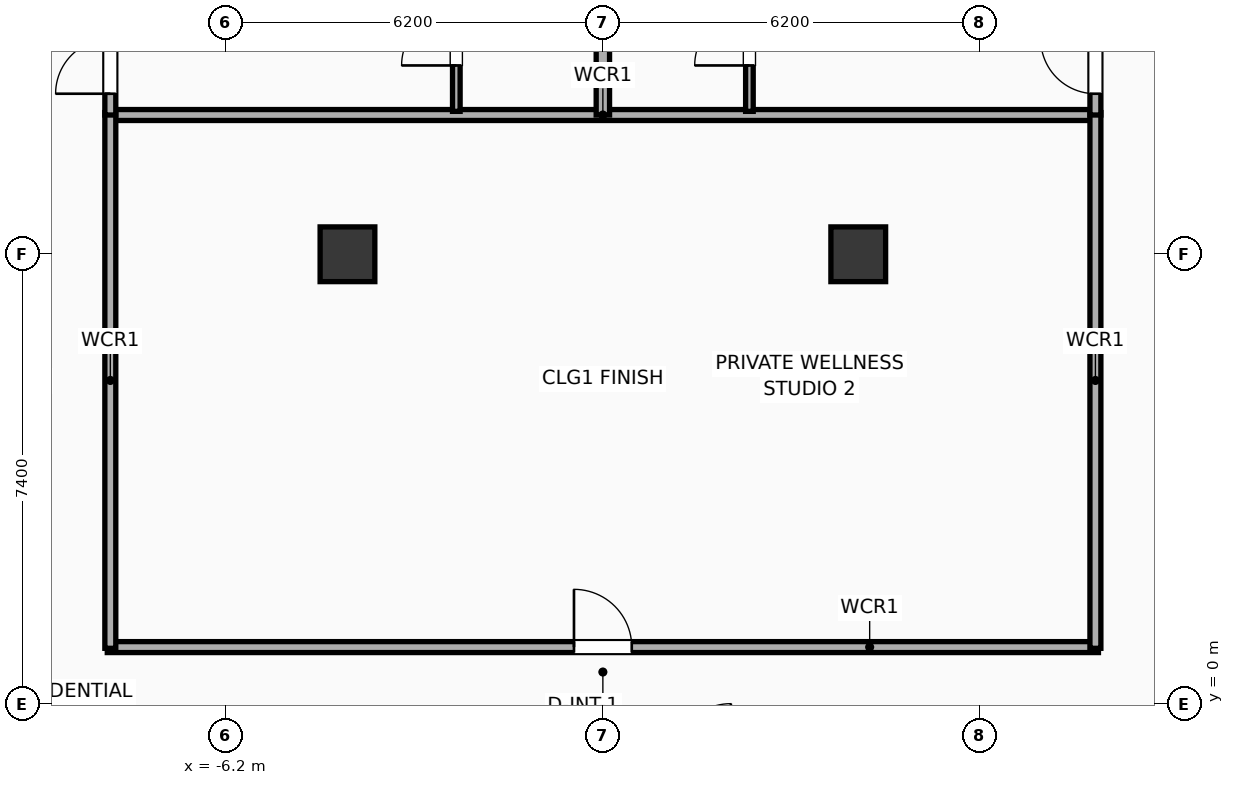
"""IFC4 building model, lengths in metres.
Left out: names, types, materials, properties, quantities, classifications, styles, units other than length and angle.
Written with IfcOpenShell. Run it as: python <this file> out.ifc"""

import sys

from ifc_helpers import new_model, si_unit, direction, frame, frame_2d, origin, origin_2d, place, context, subcontext, project, spatial, rectangle, extrude, element, fill, save


model = new_model("IFC4")
c1 = context("Model", 3, precision=1e-05, world=origin(), true_north=direction((0.0, 1.0)))
c2 = subcontext(c1, "Body", "Model", "MODEL_VIEW")
j1 = project(units=[si_unit("LENGTHUNIT", "METRE"), si_unit("PLANEANGLEUNIT", "RADIAN")], contexts=[c1])
p1 = place(None, origin())
s1 = spatial("IfcSite", under=j1, at=p1, CompositionType="ELEMENT")
p2 = place(p1, origin())
s2 = spatial("IfcBuilding", under=s1, at=p2, CompositionType="ELEMENT")
p3 = place(p2, frame((0.0, 0.0, 183.3)))
s3 = spatial("IfcBuildingStorey", under=s2, at=p3, CompositionType="ELEMENT", Elevation=183.3)
for number, where, z_axis, x_axis in (
    (1, (-4.2, 7.4, 0.0), (0.0, 0.0, 1.0), (1.0, 0.0, 0.0)),
    (2, (4.2, 7.4, 0.0), (0.0, 0.0, 1.0), (1.0, 0.0, 0.0)),
):
    element("IfcColumn", number, at=place(p3, frame(where, z_axis=z_axis, x_axis=x_axis)), inside=s3, PredefinedType="COLUMN", context=c2, shape_type="SweptSolid", body=[
        extrude(rectangle(XDim=0.9, YDim=0.9, at=origin_2d()), origin(), (0.0, 0.0, 1.0), 3.9),
    ])
p4 = place(p3, frame((-8.15, 9.69, 0.0), z_axis=(0.0, 0.0, 1.0), x_axis=(1.0, 0.0, 0.0)))
e3 = element("IfcWall", 3, at=p4, inside=s3, PredefinedType="PARTITIONING", context=c2, shape_type="SweptSolid", body=[
    extrude(rectangle(XDim=16.3, YDim=0.18, at=frame_2d((8.15, 0.0))), origin(), (0.0, 0.0, 1.0), 3.65),
])
p5 = place(p3, frame((-8.15, 0.94, 0.0), z_axis=(0.0, 0.0, 1.0), x_axis=(1.0, 0.0, 0.0)))
e4 = element("IfcWall", 4, at=p5, inside=s3, PredefinedType="PARTITIONING", context=c2, shape_type="SweptSolid", body=[
    extrude(rectangle(XDim=16.3, YDim=0.18, at=frame_2d((8.15, 0.0))), origin(), (0.0, 0.0, 1.0), 3.65),
])
p6 = place(p5, frame((7.675, 0.0, 0.0)))
e5 = element("IfcOpeningElement", 5, at=p6, cuts=e4, PredefinedType="OPENING", context=c2, shape_type="SweptSolid", body=[
    extrude(rectangle(XDim=0.95, YDim=2.05, at=frame_2d((0.475, 1.025))), frame((0.0, 0.1, 0.0), z_axis=(0.0, -1.0, 0.0), x_axis=(1.0, 0.0, 0.0)), (0.0, 0.0, 1.0), 0.2),
])
for number, where, z_axis, x_axis in (
    (6, (-8.1, 0.92, 0.0), (0.0, 0.0, 1.0), (0.0, 1.0, 0.0)),
    (7, (8.1, 0.92, 0.0), (0.0, 0.0, 1.0), (0.0, 1.0, 0.0)),
):
    element("IfcWall", number, at=place(p3, frame(where, z_axis=z_axis, x_axis=x_axis)), inside=s3, PredefinedType="PARTITIONING", context=c2, shape_type="SweptSolid", body=[
        extrude(rectangle(XDim=8.81, YDim=0.18, at=frame_2d((4.405, 0.0))), origin(), (0.0, 0.0, 1.0), 3.65),
    ])
p7 = place(p3, frame((-2.41, 9.75, 0.0), z_axis=(0.0, 0.0, 1.0), x_axis=(0.0, 1.0, 0.0)))
e8 = element("IfcWall", 8, at=p7, inside=s3, PredefinedType="PARTITIONING", context=c2, shape_type="SweptSolid", body=[
    extrude(rectangle(XDim=2.41, YDim=0.125, at=frame_2d((1.205, 0.0))), origin(), (0.0, 0.0, 1.0), 3.65),
])
p8 = place(p7, frame((0.755, 0.0, 0.0)))
e9 = element("IfcOpeningElement", 9, at=p8, cuts=e8, PredefinedType="OPENING", context=c2, shape_type="SweptSolid", body=[
    extrude(rectangle(XDim=0.9, YDim=2.05, at=frame_2d((0.45, 1.025))), frame((0.0, 0.073, 0.0), z_axis=(0.0, -1.0, 0.0), x_axis=(1.0, 0.0, 0.0)), (0.0, 0.0, 1.0), 0.145),
])
p9 = place(p3, frame((-8.1, 9.69, 0.0), z_axis=(0.0, 0.0, 1.0), x_axis=(0.0, 1.0, 0.0)))
e10 = element("IfcWall", 10, at=p9, inside=s3, PredefinedType="PARTITIONING", context=c2, shape_type="SweptSolid", body=[
    extrude(rectangle(XDim=9.536, YDim=0.18, at=frame_2d((4.768, 0.0))), origin(), (0.0, 0.0, 1.0), 3.65),
])
p10 = place(p9, frame((0.35, 0.0, 0.0)))
e11 = element("IfcOpeningElement", 11, at=p10, cuts=e10, PredefinedType="OPENING", context=c2, shape_type="SweptSolid", body=[
    extrude(rectangle(XDim=0.9, YDim=2.05, at=frame_2d((0.45, 1.025))), frame((0.0, 0.1, 0.0), z_axis=(0.0, -1.0, 0.0), x_axis=(1.0, 0.0, 0.0)), (0.0, 0.0, 1.0), 0.2),
])
p11 = place(p3, frame((2.41, 9.75, 0.0), z_axis=(0.0, 0.0, 1.0), x_axis=(0.0, 1.0, 0.0)))
e12 = element("IfcWall", 12, at=p11, inside=s3, PredefinedType="PARTITIONING", context=c2, shape_type="SweptSolid", body=[
    extrude(rectangle(XDim=2.41, YDim=0.125, at=frame_2d((1.205, 0.0))), origin(), (0.0, 0.0, 1.0), 3.65),
])
p12 = place(p11, frame((0.755, 0.0, 0.0)))
e13 = element("IfcOpeningElement", 13, at=p12, cuts=e12, PredefinedType="OPENING", context=c2, shape_type="SweptSolid", body=[
    extrude(rectangle(XDim=0.9, YDim=2.05, at=frame_2d((0.45, 1.025))), frame((0.0, 0.073, 0.0), z_axis=(0.0, -1.0, 0.0), x_axis=(1.0, 0.0, 0.0)), (0.0, 0.0, 1.0), 0.145),
])
p13 = place(p3, frame((8.1, 9.69, 0.0), z_axis=(0.0, 0.0, 1.0), x_axis=(0.0, 1.0, 0.0)))
e14 = element("IfcWall", 14, at=p13, inside=s3, PredefinedType="PARTITIONING", context=c2, shape_type="SweptSolid", body=[
    extrude(rectangle(XDim=11.239, YDim=0.18, at=frame_2d((5.62, 0.0))), origin(), (0.0, 0.0, 1.0), 3.65),
])
p14 = place(p13, frame((0.35, 0.0, 0.0)))
e15 = element("IfcOpeningElement", 15, at=p14, cuts=e14, PredefinedType="OPENING", context=c2, shape_type="SweptSolid", body=[
    extrude(rectangle(XDim=0.9, YDim=2.05, at=frame_2d((0.45, 1.025))), frame((0.0, 0.1, 0.0), z_axis=(0.0, -1.0, 0.0), x_axis=(1.0, 0.0, 0.0)), (0.0, 0.0, 1.0), 0.2),
])
p15 = place(p3, frame((0.0, 9.69, 0.0), z_axis=(0.0, 0.0, 1.0), x_axis=(0.0, 1.0, 0.0)))
e16 = element("IfcWall", 16, at=p15, inside=s3, PredefinedType="PARTITIONING", context=c2, shape_type="SweptSolid", body=[
    extrude(rectangle(XDim=10.388, YDim=0.22, at=frame_2d((5.194, 0.0))), origin(), (0.0, 0.0, 1.0), 3.04),
])
p16 = place(p6, origin())
e17 = element("IfcDoor", 17, at=p16, inside=s3, OperationType="SINGLE_SWING_LEFT", PredefinedType="DOOR", context=c2, shape_type="SweptSolid", body=[
    extrude(rectangle(XDim=0.95, YDim=2.05, at=frame_2d((0.475, 1.025))), frame((0.0, 0.025, 0.0), z_axis=(0.0, -1.0, 0.0), x_axis=(1.0, 0.0, 0.0)), (0.0, 0.0, 1.0), 0.05),
])
fill(e5, e17)
p17 = place(p8, origin())
e18 = element("IfcDoor", 18, at=p17, inside=s3, OperationType="SINGLE_SWING_LEFT", PredefinedType="DOOR", context=c2, shape_type="SweptSolid", body=[
    extrude(rectangle(XDim=0.9, YDim=2.05, at=frame_2d((0.45, 1.025))), frame((0.0, 0.025, 0.0), z_axis=(0.0, -1.0, 0.0), x_axis=(1.0, 0.0, 0.0)), (0.0, 0.0, 1.0), 0.05),
])
fill(e9, e18)
p18 = place(p10, origin())
e19 = element("IfcDoor", 19, at=p18, inside=s3, OperationType="SINGLE_SWING_LEFT", PredefinedType="DOOR", context=c2, shape_type="SweptSolid", body=[
    extrude(rectangle(XDim=0.9, YDim=2.05, at=frame_2d((0.45, 1.025))), frame((0.0, 0.025, 0.0), z_axis=(0.0, -1.0, 0.0), x_axis=(1.0, 0.0, 0.0)), (0.0, 0.0, 1.0), 0.05),
])
fill(e11, e19)
p19 = place(p12, origin())
e20 = element("IfcDoor", 20, at=p19, inside=s3, OperationType="SINGLE_SWING_LEFT", PredefinedType="DOOR", context=c2, shape_type="SweptSolid", body=[
    extrude(rectangle(XDim=0.9, YDim=2.05, at=frame_2d((0.45, 1.025))), frame((0.0, 0.025, 0.0), z_axis=(0.0, -1.0, 0.0), x_axis=(1.0, 0.0, 0.0)), (0.0, 0.0, 1.0), 0.05),
])
fill(e13, e20)
p20 = place(p14, origin())
e21 = element("IfcDoor", 21, at=p20, inside=s3, OperationType="SINGLE_SWING_RIGHT", PredefinedType="DOOR", context=c2, shape_type="SweptSolid", body=[
    extrude(rectangle(XDim=0.9, YDim=2.05, at=frame_2d((0.45, 1.025))), frame((0.0, 0.025, 0.0), z_axis=(0.0, -1.0, 0.0), x_axis=(1.0, 0.0, 0.0)), (0.0, 0.0, 1.0), 0.05),
])
fill(e15, e21)
save(model, sys.argv[1])
